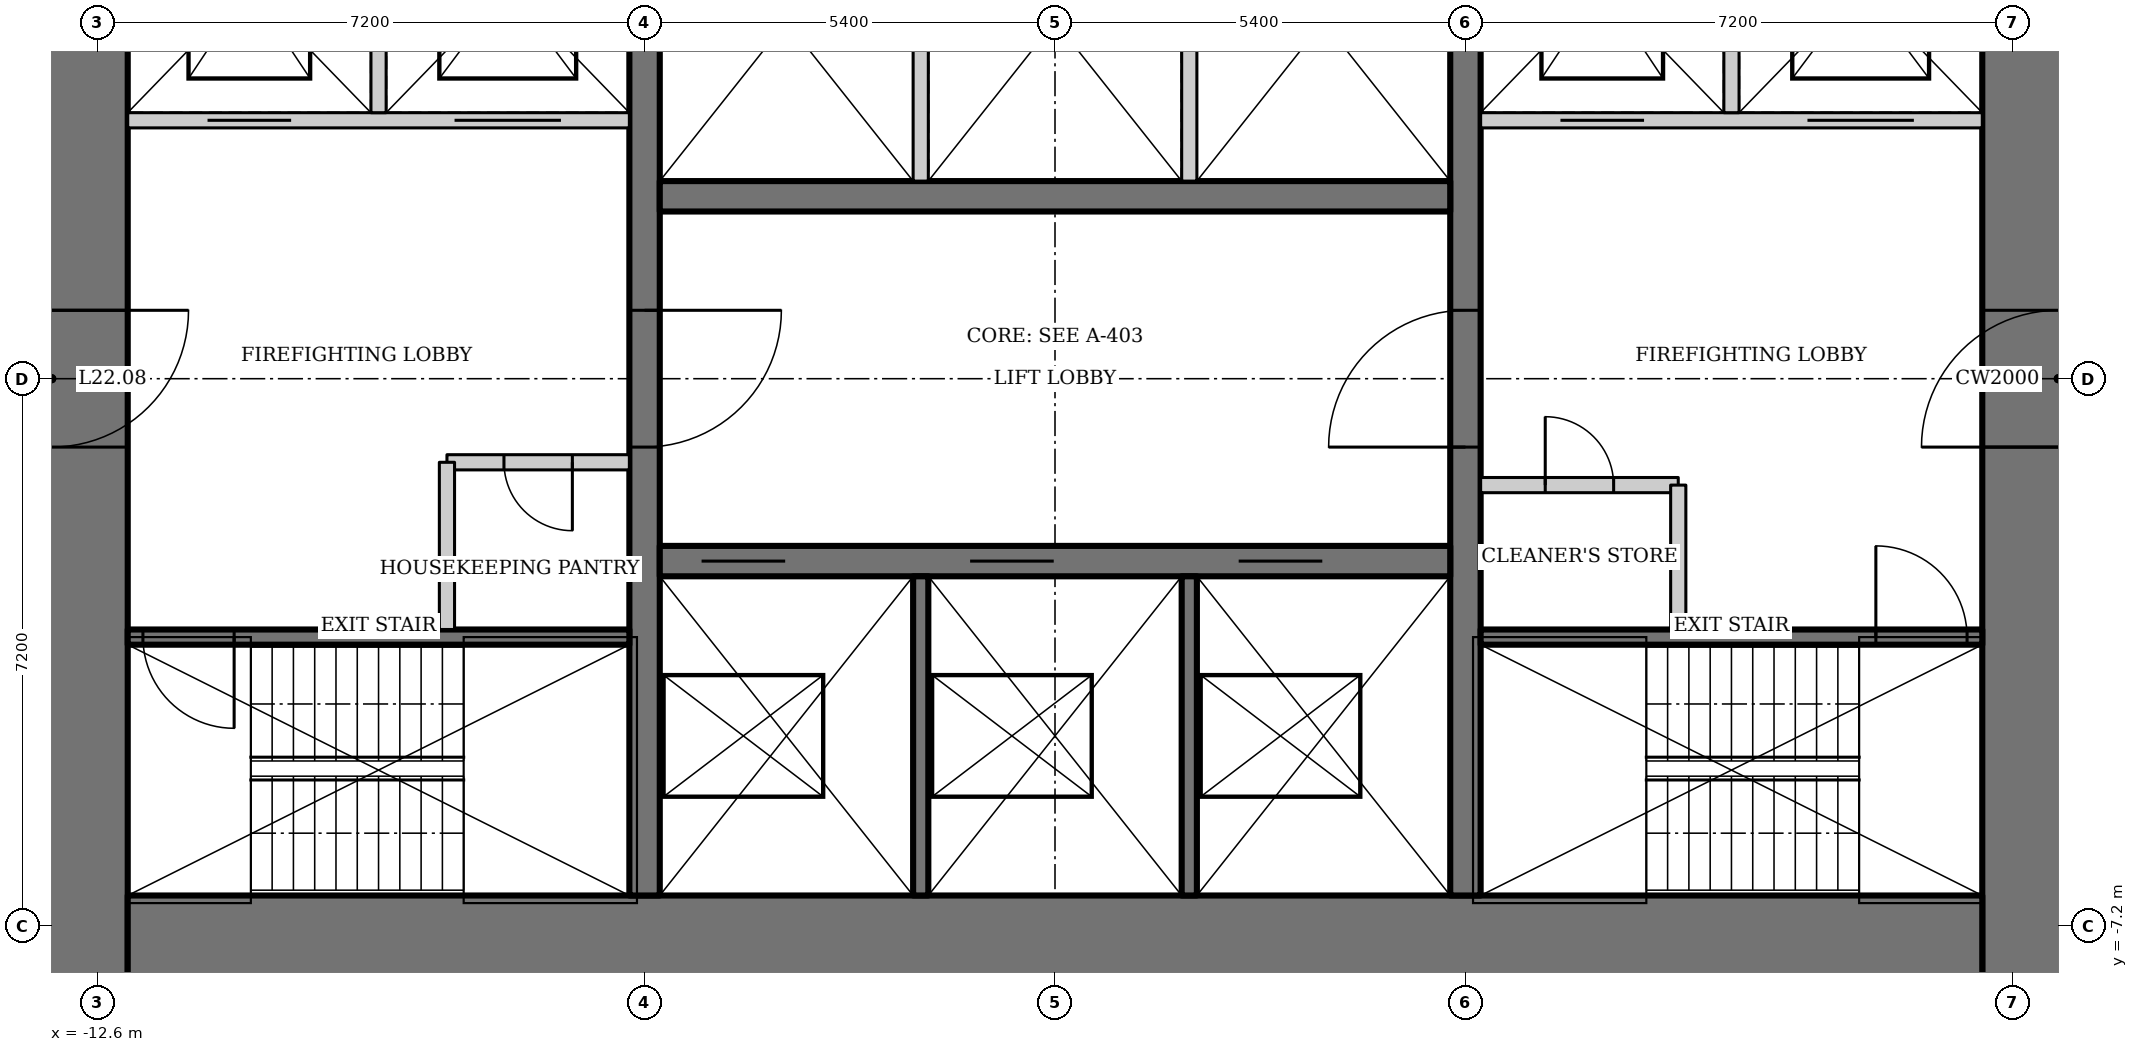
"""IFC4 building model, lengths in metres.
Left out: names, types, materials, properties, quantities, classifications, styles, units other than length and angle.
Written with IfcOpenShell. Run it as: python <this file> out.ifc"""

import sys

from ifc_helpers import new_model, si_unit, direction, frame, frame_2d, origin, place, context, subcontext, project, spatial, rectangle, extrude, element, fill, save


model = new_model("IFC4")
c1 = context("Model", 3, precision=1e-05, world=origin(), true_north=direction((0.0, 1.0)))
c2 = subcontext(c1, "Body", "Model", "MODEL_VIEW")
j1 = project(units=[si_unit("LENGTHUNIT", "METRE"), si_unit("PLANEANGLEUNIT", "RADIAN")], contexts=[c1])
p1 = place(None, origin())
s1 = spatial("IfcSite", under=j1, at=p1, CompositionType="ELEMENT")
p2 = place(p1, origin())
s2 = spatial("IfcBuilding", under=s1, at=p2, CompositionType="ELEMENT")
p3 = place(p2, frame((0.0, 0.0, 94.6)))
s3 = spatial("IfcBuildingStorey", under=s2, at=p3, CompositionType="ELEMENT", Elevation=94.6)
p4 = place(p3, frame((13.2, -13.0, 0.0), z_axis=(0.0, 0.0, 1.0), x_axis=(0.0, 1.0, 0.0)))
e1 = element("IfcWall", 1, at=p4, inside=s3, PredefinedType="SHEAR", context=c2, shape_type="SweptSolid", body=[
    extrude(rectangle(XDim=26.0, YDim=2.0, at=frame_2d((13.0, 0.0))), origin(), (0.0, 0.0, 1.0), 3.6),
])
p5 = place(p4, frame((12.1, 0.0, 0.0)))
e2 = element("IfcOpeningElement", 2, at=p5, cuts=e1, PredefinedType="OPENING", context=c2, shape_type="SweptSolid", body=[
    extrude(rectangle(XDim=1.8, YDim=2.1, at=frame_2d((0.9, 1.05))), frame((0.0, 1.01, 0.0), z_axis=(0.0, -1.0, 0.0), x_axis=(1.0, 0.0, 0.0)), (0.0, 0.0, 1.0), 2.02),
])
p6 = place(p3, frame((-13.2, 13.0, 0.0), z_axis=(0.0, 0.0, 1.0), x_axis=(0.0, -1.0, 0.0)))
e3 = element("IfcWall", 3, at=p6, inside=s3, PredefinedType="SHEAR", context=c2, shape_type="SweptSolid", body=[
    extrude(rectangle(XDim=26.0, YDim=2.0, at=frame_2d((13.0, 0.0))), origin(), (0.0, 0.0, 1.0), 3.6),
])
p7 = place(p6, frame((12.1, 0.0, 0.0)))
e4 = element("IfcOpeningElement", 4, at=p7, cuts=e3, PredefinedType="OPENING", context=c2, shape_type="SweptSolid", body=[
    extrude(rectangle(XDim=1.8, YDim=2.1, at=frame_2d((0.9, 1.05))), frame((0.0, 1.01, 0.0), z_axis=(0.0, -1.0, 0.0), x_axis=(1.0, 0.0, 0.0)), (0.0, 0.0, 1.0), 2.02),
])
p8 = place(p3, frame((-12.2, -8.0, 0.0), z_axis=(0.0, 0.0, 1.0), x_axis=(1.0, 0.0, 0.0)))
e5 = element("IfcWall", 5, at=p8, inside=s3, PredefinedType="SHEAR", context=c2, shape_type="SweptSolid", body=[
    extrude(rectangle(XDim=24.4, YDim=2.4, at=frame_2d((12.2, 0.0))), origin(), (0.0, 0.0, 1.0), 3.6),
])
p9 = place(p3, frame((5.4, -6.8, 0.0), z_axis=(0.0, 0.0, 1.0), x_axis=(0.0, 1.0, 0.0)))
e6 = element("IfcWall", 6, at=p9, inside=s3, PredefinedType="SHEAR", context=c2, shape_type="SweptSolid", body=[
    extrude(rectangle(XDim=13.6, YDim=0.4, at=frame_2d((6.8, 0.0))), origin(), (0.0, 0.0, 1.0), 3.6),
])
p10 = place(p9, frame((5.9, 0.0, 0.0)))
e7 = element("IfcOpeningElement", 7, at=p10, cuts=e6, PredefinedType="OPENING", context=c2, shape_type="SweptSolid", body=[
    extrude(rectangle(XDim=1.8, YDim=2.1, at=frame_2d((0.9, 1.05))), frame((0.0, 0.21, 0.0), z_axis=(0.0, -1.0, 0.0), x_axis=(1.0, 0.0, 0.0)), (0.0, 0.0, 1.0), 0.42),
])
p11 = place(p3, frame((-5.4, 6.8, 0.0), z_axis=(0.0, 0.0, 1.0), x_axis=(0.0, -1.0, 0.0)))
e8 = element("IfcWall", 8, at=p11, inside=s3, PredefinedType="SHEAR", context=c2, shape_type="SweptSolid", body=[
    extrude(rectangle(XDim=13.6, YDim=0.4, at=frame_2d((6.8, 0.0))), origin(), (0.0, 0.0, 1.0), 3.6),
])
p12 = place(p11, frame((5.9, 0.0, 0.0)))
e9 = element("IfcOpeningElement", 9, at=p12, cuts=e8, PredefinedType="OPENING", context=c2, shape_type="SweptSolid", body=[
    extrude(rectangle(XDim=1.8, YDim=2.1, at=frame_2d((0.9, 1.05))), frame((0.0, 0.21, 0.0), z_axis=(0.0, -1.0, 0.0), x_axis=(1.0, 0.0, 0.0)), (0.0, 0.0, 1.0), 0.42),
])
p13 = place(p3, frame((-5.2, -2.4, 0.0), z_axis=(0.0, 0.0, 1.0), x_axis=(1.0, 0.0, 0.0)))
e10 = element("IfcWall", 10, at=p13, inside=s3, PredefinedType="SHEAR", context=c2, shape_type="SweptSolid", body=[
    extrude(rectangle(XDim=10.4, YDim=0.4, at=frame_2d((5.2, 0.0))), origin(), (0.0, 0.0, 1.0), 3.6),
])
p14 = place(p13, frame((0.55, 0.0, 0.0)))
e11 = element("IfcOpeningElement", 11, at=p14, cuts=e10, PredefinedType="OPENING", context=c2, shape_type="SweptSolid", body=[
    extrude(rectangle(XDim=1.1, YDim=2.2, at=frame_2d((0.55, 1.1))), frame((0.0, 0.21, 0.0), z_axis=(0.0, -1.0, 0.0), x_axis=(1.0, 0.0, 0.0)), (0.0, 0.0, 1.0), 0.42),
])
p15 = place(p13, frame((4.083, 0.0, 0.0)))
e12 = element("IfcOpeningElement", 12, at=p15, cuts=e10, PredefinedType="OPENING", context=c2, shape_type="SweptSolid", body=[
    extrude(rectangle(XDim=1.1, YDim=2.2, at=frame_2d((0.55, 1.1))), frame((0.0, 0.21, 0.0), z_axis=(0.0, -1.0, 0.0), x_axis=(1.0, 0.0, 0.0)), (0.0, 0.0, 1.0), 0.42),
])
p16 = place(p13, frame((7.617, 0.0, 0.0)))
e13 = element("IfcOpeningElement", 13, at=p16, cuts=e10, PredefinedType="OPENING", context=c2, shape_type="SweptSolid", body=[
    extrude(rectangle(XDim=1.1, YDim=2.2, at=frame_2d((0.55, 1.1))), frame((0.0, 0.21, 0.0), z_axis=(0.0, -1.0, 0.0), x_axis=(1.0, 0.0, 0.0)), (0.0, 0.0, 1.0), 0.42),
])
for number, where, z_axis, x_axis in (
    (14, (-1.767, -2.6, 0.0), (0.0, 0.0, 1.0), (0.0, -1.0, 0.0)),
    (15, (1.767, -2.6, 0.0), (0.0, 0.0, 1.0), (0.0, -1.0, 0.0)),
):
    element("IfcWall", number, at=place(p3, frame(where, z_axis=z_axis, x_axis=x_axis)), inside=s3, PredefinedType="SOLIDWALL", context=c2, shape_type="SweptSolid", body=[
        extrude(rectangle(XDim=4.2, YDim=0.2, at=frame_2d((2.1, 0.0))), origin(), (0.0, 0.0, 1.0), 3.6),
    ])
p17 = place(p3, frame((5.2, 2.4, 0.0), z_axis=(0.0, 0.0, 1.0), x_axis=(-1.0, 0.0, 0.0)))
e16 = element("IfcWall", 16, at=p17, inside=s3, PredefinedType="SHEAR", context=c2, shape_type="SweptSolid", body=[
    extrude(rectangle(XDim=10.4, YDim=0.4, at=frame_2d((5.2, 0.0))), origin(), (0.0, 0.0, 1.0), 3.6),
])
for number, where, z_axis, x_axis in (
    (17, (-1.767, 2.6, 0.0), (0.0, 0.0, 1.0), (0.0, 1.0, 0.0)),
    (18, (1.767, 2.6, 0.0), (0.0, 0.0, 1.0), (0.0, 1.0, 0.0)),
):
    element("IfcWall", number, at=place(p3, frame(where, z_axis=z_axis, x_axis=x_axis)), inside=s3, PredefinedType="SOLIDWALL", context=c2, shape_type="SweptSolid", body=[
        extrude(rectangle(XDim=4.2, YDim=0.2, at=frame_2d((2.1, 0.0))), origin(), (0.0, 0.0, 1.0), 3.6),
    ])
p18 = place(p3, frame((5.6, -3.4, 0.0), z_axis=(0.0, 0.0, 1.0), x_axis=(1.0, 0.0, 0.0)))
e19 = element("IfcWall", 19, at=p18, inside=s3, PredefinedType="SHEAR", context=c2, shape_type="SweptSolid", body=[
    extrude(rectangle(XDim=6.6, YDim=0.2, at=frame_2d((3.3, 0.0))), origin(), (0.0, 0.0, 1.0), 3.6),
])
p19 = place(p18, frame((5.2, 0.0, 0.0)))
e20 = element("IfcOpeningElement", 20, at=p19, cuts=e19, PredefinedType="OPENING", context=c2, shape_type="SweptSolid", body=[
    extrude(rectangle(XDim=1.2, YDim=2.1, at=frame_2d((0.6, 1.05))), frame((0.0, 0.11, 0.0), z_axis=(0.0, -1.0, 0.0), x_axis=(1.0, 0.0, 0.0)), (0.0, 0.0, 1.0), 0.22),
])
p20 = place(p3, frame((12.2, 3.4, 0.0), z_axis=(0.0, 0.0, 1.0), x_axis=(-1.0, 0.0, 0.0)))
e21 = element("IfcWall", 21, at=p20, inside=s3, PredefinedType="SOLIDWALL", context=c2, shape_type="SweptSolid", body=[
    extrude(rectangle(XDim=6.6, YDim=0.2, at=frame_2d((3.3, 0.0))), origin(), (0.0, 0.0, 1.0), 3.6),
])
p21 = place(p20, frame((4.45, 0.0, 0.0)))
e22 = element("IfcOpeningElement", 22, at=p21, cuts=e21, PredefinedType="OPENING", context=c2, shape_type="SweptSolid", body=[
    extrude(rectangle(XDim=1.1, YDim=2.2, at=frame_2d((0.55, 1.1))), frame((0.0, 0.11, 0.0), z_axis=(0.0, -1.0, 0.0), x_axis=(1.0, 0.0, 0.0)), (0.0, 0.0, 1.0), 0.22),
])
p22 = place(p20, frame((0.9, 0.0, 0.0)))
e23 = element("IfcOpeningElement", 23, at=p22, cuts=e21, PredefinedType="OPENING", context=c2, shape_type="SweptSolid", body=[
    extrude(rectangle(XDim=1.4, YDim=2.2, at=frame_2d((0.7, 1.1))), frame((0.0, 0.11, 0.0), z_axis=(0.0, -1.0, 0.0), x_axis=(1.0, 0.0, 0.0)), (0.0, 0.0, 1.0), 0.22),
])
p23 = place(p3, frame((8.9, 3.5, 0.0), z_axis=(0.0, 0.0, 1.0), x_axis=(0.0, 1.0, 0.0)))
e24 = element("IfcWall", 24, at=p23, inside=s3, PredefinedType="SOLIDWALL", context=c2, shape_type="SweptSolid", body=[
    extrude(rectangle(XDim=3.3, YDim=0.2, at=frame_2d((1.65, 0.0))), origin(), (0.0, 0.0, 1.0), 3.6),
])
p24 = place(p3, frame((-5.6, -3.4, 0.0), z_axis=(0.0, 0.0, 1.0), x_axis=(-1.0, 0.0, 0.0)))
e25 = element("IfcWall", 25, at=p24, inside=s3, PredefinedType="SHEAR", context=c2, shape_type="SweptSolid", body=[
    extrude(rectangle(XDim=6.6, YDim=0.2, at=frame_2d((3.3, 0.0))), origin(), (0.0, 0.0, 1.0), 3.6),
])
p25 = place(p24, frame((5.2, 0.0, 0.0)))
e26 = element("IfcOpeningElement", 26, at=p25, cuts=e25, PredefinedType="OPENING", context=c2, shape_type="SweptSolid", body=[
    extrude(rectangle(XDim=1.2, YDim=2.1, at=frame_2d((0.6, 1.05))), frame((0.0, 0.11, 0.0), z_axis=(0.0, -1.0, 0.0), x_axis=(1.0, 0.0, 0.0)), (0.0, 0.0, 1.0), 0.22),
])
p26 = place(p3, frame((-12.2, 3.4, 0.0), z_axis=(0.0, 0.0, 1.0), x_axis=(1.0, 0.0, 0.0)))
e27 = element("IfcWall", 27, at=p26, inside=s3, PredefinedType="SOLIDWALL", context=c2, shape_type="SweptSolid", body=[
    extrude(rectangle(XDim=6.6, YDim=0.2, at=frame_2d((3.3, 0.0))), origin(), (0.0, 0.0, 1.0), 3.6),
])
p27 = place(p26, frame((1.05, 0.0, 0.0)))
e28 = element("IfcOpeningElement", 28, at=p27, cuts=e27, PredefinedType="OPENING", context=c2, shape_type="SweptSolid", body=[
    extrude(rectangle(XDim=1.1, YDim=2.2, at=frame_2d((0.55, 1.1))), frame((0.0, 0.11, 0.0), z_axis=(0.0, -1.0, 0.0), x_axis=(1.0, 0.0, 0.0)), (0.0, 0.0, 1.0), 0.22),
])
p28 = place(p26, frame((4.3, 0.0, 0.0)))
e29 = element("IfcOpeningElement", 29, at=p28, cuts=e27, PredefinedType="OPENING", context=c2, shape_type="SweptSolid", body=[
    extrude(rectangle(XDim=1.4, YDim=2.2, at=frame_2d((0.7, 1.1))), frame((0.0, 0.11, 0.0), z_axis=(0.0, -1.0, 0.0), x_axis=(1.0, 0.0, 0.0)), (0.0, 0.0, 1.0), 0.22),
])
p29 = place(p3, frame((-8.9, 3.5, 0.0), z_axis=(0.0, 0.0, 1.0), x_axis=(0.0, 1.0, 0.0)))
e30 = element("IfcWall", 30, at=p29, inside=s3, PredefinedType="SOLIDWALL", context=c2, shape_type="SweptSolid", body=[
    extrude(rectangle(XDim=3.3, YDim=0.2, at=frame_2d((1.65, 0.0))), origin(), (0.0, 0.0, 1.0), 3.6),
])
p30 = place(p3, frame((-5.6, -1.1, 0.0), z_axis=(0.0, 0.0, 1.0), x_axis=(-1.0, 0.0, 0.0)))
e31 = element("IfcWall", 31, at=p30, inside=s3, PredefinedType="SOLIDWALL", context=c2, shape_type="SweptSolid", body=[
    extrude(rectangle(XDim=2.4, YDim=0.2, at=frame_2d((1.2, 0.0))), origin(), (0.0, 0.0, 1.0), 3.45),
])
p31 = place(p30, frame((0.75, 0.0, 0.0)))
e32 = element("IfcOpeningElement", 32, at=p31, cuts=e31, PredefinedType="OPENING", context=c2, shape_type="SweptSolid", body=[
    extrude(rectangle(XDim=0.9, YDim=2.1, at=frame_2d((0.45, 1.05))), frame((0.0, 0.11, 0.0), z_axis=(0.0, -1.0, 0.0), x_axis=(1.0, 0.0, 0.0)), (0.0, 0.0, 1.0), 0.22),
])
p32 = place(p3, frame((-8.0, -1.1, 0.0), z_axis=(0.0, 0.0, 1.0), x_axis=(0.0, -1.0, 0.0)))
e33 = element("IfcWall", 33, at=p32, inside=s3, PredefinedType="SOLIDWALL", context=c2, shape_type="SweptSolid", body=[
    extrude(rectangle(XDim=2.2, YDim=0.2, at=frame_2d((1.1, 0.0))), origin(), (0.0, 0.0, 1.0), 3.45),
])
p33 = place(p3, frame((5.6, -1.4, 0.0), z_axis=(0.0, 0.0, 1.0), x_axis=(1.0, 0.0, 0.0)))
e34 = element("IfcWall", 34, at=p33, inside=s3, PredefinedType="SOLIDWALL", context=c2, shape_type="SweptSolid", body=[
    extrude(rectangle(XDim=2.6, YDim=0.2, at=frame_2d((1.3, 0.0))), origin(), (0.0, 0.0, 1.0), 3.45),
])
p34 = place(p33, frame((0.85, 0.0, 0.0)))
e35 = element("IfcOpeningElement", 35, at=p34, cuts=e34, PredefinedType="OPENING", context=c2, shape_type="SweptSolid", body=[
    extrude(rectangle(XDim=0.9, YDim=2.1, at=frame_2d((0.45, 1.05))), frame((0.0, 0.11, 0.0), z_axis=(0.0, -1.0, 0.0), x_axis=(1.0, 0.0, 0.0)), (0.0, 0.0, 1.0), 0.22),
])
p35 = place(p3, frame((8.2, -1.4, 0.0), z_axis=(0.0, 0.0, 1.0), x_axis=(0.0, -1.0, 0.0)))
e36 = element("IfcWall", 36, at=p35, inside=s3, PredefinedType="SOLIDWALL", context=c2, shape_type="SweptSolid", body=[
    extrude(rectangle(XDim=1.9, YDim=0.2, at=frame_2d((0.95, 0.0))), origin(), (0.0, 0.0, 1.0), 3.45),
])
p36 = place(p31, origin())
e37 = element("IfcDoor", 37, at=p36, inside=s3, OperationType="SINGLE_SWING_LEFT", PredefinedType="DOOR", context=c2, shape_type="SweptSolid", body=[
    extrude(rectangle(XDim=0.9, YDim=2.1, at=frame_2d((0.45, 1.05))), frame((0.0, 0.025, 0.0), z_axis=(0.0, -1.0, 0.0), x_axis=(1.0, 0.0, 0.0)), (0.0, 0.0, 1.0), 0.05),
])
fill(e32, e37)
p37 = place(p34, origin())
e38 = element("IfcDoor", 38, at=p37, inside=s3, OperationType="SINGLE_SWING_LEFT", PredefinedType="DOOR", context=c2, shape_type="SweptSolid", body=[
    extrude(rectangle(XDim=0.9, YDim=2.1, at=frame_2d((0.45, 1.05))), frame((0.0, 0.025, 0.0), z_axis=(0.0, -1.0, 0.0), x_axis=(1.0, 0.0, 0.0)), (0.0, 0.0, 1.0), 0.05),
])
fill(e35, e38)
p38 = place(p10, origin())
e39 = element("IfcDoor", 39, at=p38, inside=s3, OperationType="DOUBLE_DOOR_DOUBLE_SWING", PredefinedType="DOOR", context=c2, shape_type="SweptSolid", body=[
    extrude(rectangle(XDim=1.8, YDim=2.1, at=frame_2d((0.9, 1.05))), frame((0.0, 0.025, 0.0), z_axis=(0.0, -1.0, 0.0), x_axis=(1.0, 0.0, 0.0)), (0.0, 0.0, 1.0), 0.05),
])
fill(e7, e39)
p39 = place(p12, origin())
e40 = element("IfcDoor", 40, at=p39, inside=s3, OperationType="DOUBLE_DOOR_DOUBLE_SWING", PredefinedType="DOOR", context=c2, shape_type="SweptSolid", body=[
    extrude(rectangle(XDim=1.8, YDim=2.1, at=frame_2d((0.9, 1.05))), frame((0.0, 0.025, 0.0), z_axis=(0.0, -1.0, 0.0), x_axis=(1.0, 0.0, 0.0)), (0.0, 0.0, 1.0), 0.05),
])
fill(e9, e40)
p40 = place(p19, origin())
e41 = element("IfcDoor", 41, at=p40, inside=s3, OperationType="SINGLE_SWING_RIGHT", PredefinedType="DOOR", context=c2, shape_type="SweptSolid", body=[
    extrude(rectangle(XDim=1.2, YDim=2.1, at=frame_2d((0.6, 1.05))), frame((0.0, 0.025, 0.0), z_axis=(0.0, -1.0, 0.0), x_axis=(1.0, 0.0, 0.0)), (0.0, 0.0, 1.0), 0.05),
])
fill(e20, e41)
p41 = place(p25, origin())
e42 = element("IfcDoor", 42, at=p41, inside=s3, OperationType="SINGLE_SWING_RIGHT", PredefinedType="DOOR", context=c2, shape_type="SweptSolid", body=[
    extrude(rectangle(XDim=1.2, YDim=2.1, at=frame_2d((0.6, 1.05))), frame((0.0, 0.025, 0.0), z_axis=(0.0, -1.0, 0.0), x_axis=(1.0, 0.0, 0.0)), (0.0, 0.0, 1.0), 0.05),
])
fill(e26, e42)
p42 = place(p5, origin())
e43 = element("IfcDoor", 43, at=p42, inside=s3, OperationType="DOUBLE_DOOR_DOUBLE_SWING", PredefinedType="DOOR", context=c2, shape_type="SweptSolid", body=[
    extrude(rectangle(XDim=1.8, YDim=2.1, at=frame_2d((0.9, 1.05))), frame((0.0, 0.025, 0.0), z_axis=(0.0, -1.0, 0.0), x_axis=(1.0, 0.0, 0.0)), (0.0, 0.0, 1.0), 0.05),
])
fill(e2, e43)
p43 = place(p7, origin())
e44 = element("IfcDoor", 44, at=p43, inside=s3, OperationType="DOUBLE_DOOR_DOUBLE_SWING", PredefinedType="DOOR", context=c2, shape_type="SweptSolid", body=[
    extrude(rectangle(XDim=1.8, YDim=2.1, at=frame_2d((0.9, 1.05))), frame((0.0, 0.025, 0.0), z_axis=(0.0, -1.0, 0.0), x_axis=(1.0, 0.0, 0.0)), (0.0, 0.0, 1.0), 0.05),
])
fill(e4, e44)
p44 = place(p14, origin())
e45 = element("IfcDoor", 45, at=p44, inside=s3, OperationType="DOUBLE_DOOR_SLIDING", PredefinedType="DOOR", context=c2, shape_type="SweptSolid", body=[
    extrude(rectangle(XDim=1.1, YDim=2.2, at=frame_2d((0.55, 1.1))), frame((0.0, 0.025, 0.0), z_axis=(0.0, -1.0, 0.0), x_axis=(1.0, 0.0, 0.0)), (0.0, 0.0, 1.0), 0.05),
])
fill(e11, e45)
p45 = place(p15, origin())
e46 = element("IfcDoor", 46, at=p45, inside=s3, OperationType="DOUBLE_DOOR_SLIDING", PredefinedType="DOOR", context=c2, shape_type="SweptSolid", body=[
    extrude(rectangle(XDim=1.1, YDim=2.2, at=frame_2d((0.55, 1.1))), frame((0.0, 0.025, 0.0), z_axis=(0.0, -1.0, 0.0), x_axis=(1.0, 0.0, 0.0)), (0.0, 0.0, 1.0), 0.05),
])
fill(e12, e46)
p46 = place(p16, origin())
e47 = element("IfcDoor", 47, at=p46, inside=s3, OperationType="DOUBLE_DOOR_SLIDING", PredefinedType="DOOR", context=c2, shape_type="SweptSolid", body=[
    extrude(rectangle(XDim=1.1, YDim=2.2, at=frame_2d((0.55, 1.1))), frame((0.0, 0.025, 0.0), z_axis=(0.0, -1.0, 0.0), x_axis=(1.0, 0.0, 0.0)), (0.0, 0.0, 1.0), 0.05),
])
fill(e13, e47)
p47 = place(p27, origin())
e48 = element("IfcDoor", 48, at=p47, inside=s3, OperationType="DOUBLE_DOOR_SLIDING", PredefinedType="DOOR", context=c2, shape_type="SweptSolid", body=[
    extrude(rectangle(XDim=1.1, YDim=2.2, at=frame_2d((0.55, 1.1))), frame((0.0, 0.025, 0.0), z_axis=(0.0, -1.0, 0.0), x_axis=(1.0, 0.0, 0.0)), (0.0, 0.0, 1.0), 0.05),
])
fill(e28, e48)
p48 = place(p28, origin())
e49 = element("IfcDoor", 49, at=p48, inside=s3, OperationType="DOUBLE_DOOR_SLIDING", PredefinedType="DOOR", context=c2, shape_type="SweptSolid", body=[
    extrude(rectangle(XDim=1.4, YDim=2.2, at=frame_2d((0.7, 1.1))), frame((0.0, 0.025, 0.0), z_axis=(0.0, -1.0, 0.0), x_axis=(1.0, 0.0, 0.0)), (0.0, 0.0, 1.0), 0.05),
])
fill(e29, e49)
p49 = place(p21, origin())
e50 = element("IfcDoor", 50, at=p49, inside=s3, OperationType="DOUBLE_DOOR_SLIDING", PredefinedType="DOOR", context=c2, shape_type="SweptSolid", body=[
    extrude(rectangle(XDim=1.1, YDim=2.2, at=frame_2d((0.55, 1.1))), frame((0.0, 0.025, 0.0), z_axis=(0.0, -1.0, 0.0), x_axis=(1.0, 0.0, 0.0)), (0.0, 0.0, 1.0), 0.05),
])
fill(e22, e50)
p50 = place(p22, origin())
e51 = element("IfcDoor", 51, at=p50, inside=s3, OperationType="DOUBLE_DOOR_SLIDING", PredefinedType="DOOR", context=c2, shape_type="SweptSolid", body=[
    extrude(rectangle(XDim=1.4, YDim=2.2, at=frame_2d((0.7, 1.1))), frame((0.0, 0.025, 0.0), z_axis=(0.0, -1.0, 0.0), x_axis=(1.0, 0.0, 0.0)), (0.0, 0.0, 1.0), 0.05),
])
fill(e23, e51)
save(model, sys.argv[1])
